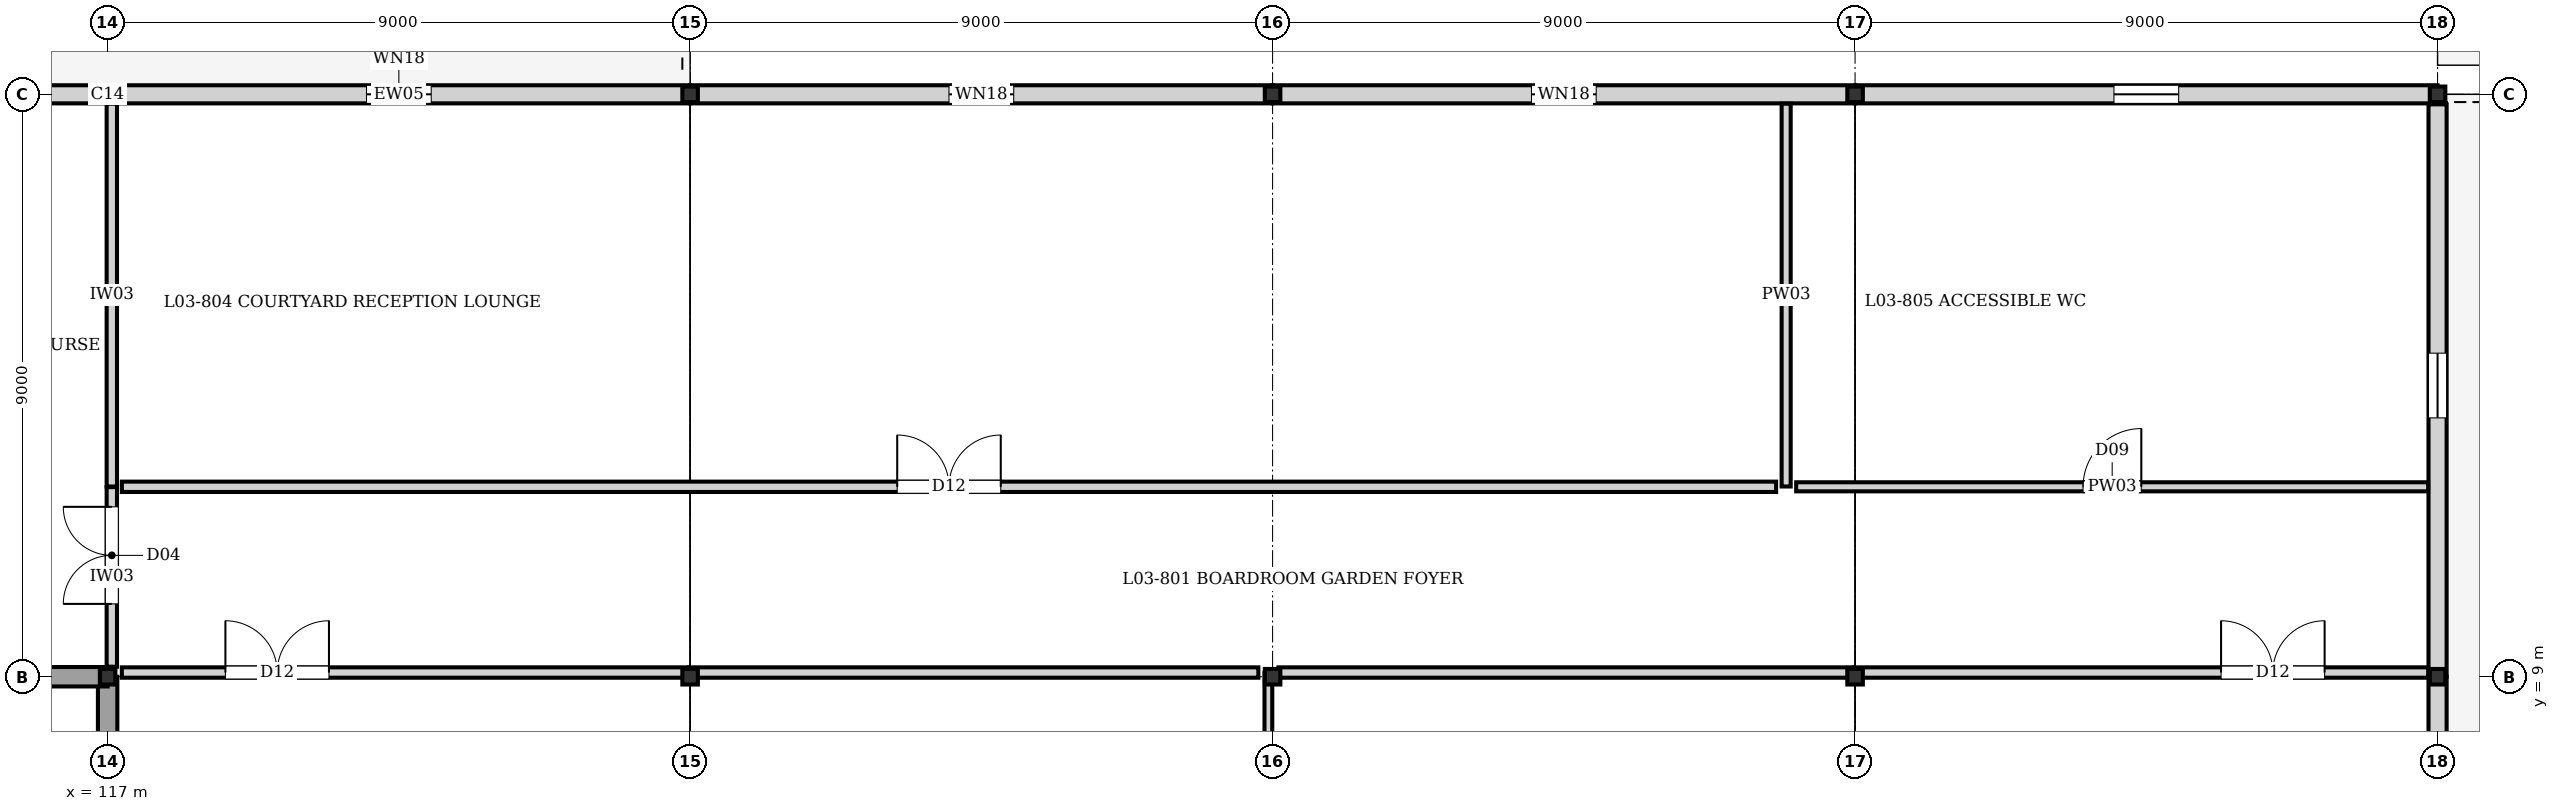
"""IFC4 building model, lengths in metres.
Left out: names, types, materials, properties, quantities, classifications, styles, units other than length and angle.
Written with IfcOpenShell. Run it as: python <this file> out.ifc"""

import sys

from ifc_helpers import new_model, si_unit, direction, frame, frame_2d, origin, origin_2d, place, context, subcontext, project, spatial, rectangle, i_section, extrude, element, fill, save


model = new_model("IFC4")
c1 = context("Model", 3, precision=1e-05, world=origin(), true_north=direction((0.0, 1.0)))
c2 = subcontext(c1, "Body", "Model", "MODEL_VIEW")
j1 = project(units=[si_unit("LENGTHUNIT", "METRE"), si_unit("PLANEANGLEUNIT", "RADIAN")], contexts=[c1])
p1 = place(None, origin())
s1 = spatial("IfcSite", under=j1, at=p1, CompositionType="ELEMENT")
p2 = place(p1, origin())
s2 = spatial("IfcBuilding", under=s1, at=p2, CompositionType="ELEMENT")
p3 = place(p2, frame((0.0, 0.0, 11.52)))
s3 = spatial("IfcBuildingStorey", under=s2, at=p3, CompositionType="ELEMENT", Elevation=11.52)
for number, where, z_axis, x_axis in (
    (1, (117.0, 9.0, 0.0), (0.0, 0.0, 1.0), (1.0, 0.0, 0.0)),
    (2, (117.0, 18.0, 0.0), (0.0, 0.0, 1.0), (1.0, 0.0, 0.0)),
    (3, (126.0, 9.0, 0.0), (0.0, 0.0, 1.0), (1.0, 0.0, 0.0)),
    (4, (126.0, 18.0, 0.0), (0.0, 0.0, 1.0), (1.0, 0.0, 0.0)),
    (5, (135.0, 9.0, 0.0), (0.0, 0.0, 1.0), (1.0, 0.0, 0.0)),
    (6, (135.0, 18.0, 0.0), (0.0, 0.0, 1.0), (1.0, 0.0, 0.0)),
    (7, (144.0, 9.0, 0.0), (0.0, 0.0, 1.0), (1.0, 0.0, 0.0)),
    (8, (144.0, 18.0, 0.0), (0.0, 0.0, 1.0), (1.0, 0.0, 0.0)),
    (9, (153.0, 9.0, 0.0), (0.0, 0.0, 1.0), (1.0, 0.0, 0.0)),
    (10, (153.0, 18.0, 0.0), (0.0, 0.0, 1.0), (1.0, 0.0, 0.0)),
):
    element("IfcColumn", number, at=place(p3, frame(where, z_axis=z_axis, x_axis=x_axis)), inside=s3, PredefinedType="COLUMN", context=c2, shape_type="SweptSolid", body=[
        extrude(i_section(OverallWidth=0.24, OverallDepth=0.24, WebThickness=0.01, FlangeThickness=0.017, at=origin_2d()), origin(), (0.0, 0.0, 1.0), 3.04),
    ])
p4 = place(p3, frame((108.0, 18.0, 0.0), z_axis=(0.0, 0.0, 1.0), x_axis=(1.0, 0.0, 0.0)))
e11 = element("IfcWall", 11, at=p4, inside=s3, PredefinedType="SOLIDWALL", context=c2, shape_type="SweptSolid", body=[
    extrude(rectangle(XDim=9.0, YDim=0.28, at=frame_2d((4.5, 0.0))), origin(), (0.0, 0.0, 1.0), 2.48),
])
p5 = place(p4, frame((3.7, 0.0, 0.0)))
e12 = element("IfcOpeningElement", 12, at=p5, cuts=e11, PredefinedType="OPENING", context=c2, shape_type="SweptSolid", body=[
    extrude(rectangle(XDim=1.6, YDim=2.25, at=frame_2d((0.8, 1.125))), frame((0.0, 0.15, 0.0), z_axis=(0.0, -1.0, 0.0), x_axis=(1.0, 0.0, 0.0)), (0.0, 0.0, 1.0), 0.3),
])
p6 = place(p3, frame((117.0, 18.0, 0.0), z_axis=(0.0, 0.0, 1.0), x_axis=(1.0, 0.0, 0.0)))
e13 = element("IfcWall", 13, at=p6, inside=s3, PredefinedType="SOLIDWALL", context=c2, shape_type="SweptSolid", body=[
    extrude(rectangle(XDim=9.0, YDim=0.28, at=frame_2d((4.5, 0.0))), origin(), (0.0, 0.0, 1.0), 2.42),
])
p7 = place(p6, frame((4.0, 0.0, 0.4)))
e14 = element("IfcOpeningElement", 14, at=p7, cuts=e13, PredefinedType="OPENING", context=c2, shape_type="SweptSolid", body=[
    extrude(rectangle(XDim=1.0, YDim=1.6, at=frame_2d((0.5, 0.8))), frame((0.0, 0.15, 0.0), z_axis=(0.0, -1.0, 0.0), x_axis=(1.0, 0.0, 0.0)), (0.0, 0.0, 1.0), 0.3),
])
p8 = place(p3, frame((126.0, 18.0, 0.0), z_axis=(0.0, 0.0, 1.0), x_axis=(1.0, 0.0, 0.0)))
e15 = element("IfcWall", 15, at=p8, inside=s3, PredefinedType="SOLIDWALL", context=c2, shape_type="SweptSolid", body=[
    extrude(rectangle(XDim=9.0, YDim=0.28, at=frame_2d((4.5, 0.0))), origin(), (0.0, 0.0, 1.0), 2.38),
])
p9 = place(p8, frame((4.0, 0.0, 0.4)))
e16 = element("IfcOpeningElement", 16, at=p9, cuts=e15, PredefinedType="OPENING", context=c2, shape_type="SweptSolid", body=[
    extrude(rectangle(XDim=1.0, YDim=1.6, at=frame_2d((0.5, 0.8))), frame((0.0, 0.15, 0.0), z_axis=(0.0, -1.0, 0.0), x_axis=(1.0, 0.0, 0.0)), (0.0, 0.0, 1.0), 0.3),
])
p10 = place(p3, frame((135.0, 18.0, 0.0), z_axis=(0.0, 0.0, 1.0), x_axis=(1.0, 0.0, 0.0)))
e17 = element("IfcWall", 17, at=p10, inside=s3, PredefinedType="SOLIDWALL", context=c2, shape_type="SweptSolid", body=[
    extrude(rectangle(XDim=9.0, YDim=0.28, at=frame_2d((4.5, 0.0))), origin(), (0.0, 0.0, 1.0), 2.55),
])
p11 = place(p10, frame((4.0, 0.0, 0.4)))
e18 = element("IfcOpeningElement", 18, at=p11, cuts=e17, PredefinedType="OPENING", context=c2, shape_type="SweptSolid", body=[
    extrude(rectangle(XDim=1.0, YDim=1.6, at=frame_2d((0.5, 0.8))), frame((0.0, 0.15, 0.0), z_axis=(0.0, -1.0, 0.0), x_axis=(1.0, 0.0, 0.0)), (0.0, 0.0, 1.0), 0.3),
])
p12 = place(p3, frame((144.0, 18.0, 0.0), z_axis=(0.0, 0.0, 1.0), x_axis=(1.0, 0.0, 0.0)))
e19 = element("IfcWall", 19, at=p12, inside=s3, PredefinedType="SOLIDWALL", context=c2, shape_type="SweptSolid", body=[
    extrude(rectangle(XDim=9.0, YDim=0.28, at=frame_2d((4.5, 0.0))), origin(), (0.0, 0.0, 1.0), 2.48),
])
p13 = place(p12, frame((4.0, 0.0, 0.4)))
e20 = element("IfcOpeningElement", 20, at=p13, cuts=e19, PredefinedType="OPENING", context=c2, shape_type="SweptSolid", body=[
    extrude(rectangle(XDim=1.0, YDim=1.6, at=frame_2d((0.5, 0.8))), frame((0.0, 0.15, 0.0), z_axis=(0.0, -1.0, 0.0), x_axis=(1.0, 0.0, 0.0)), (0.0, 0.0, 1.0), 0.3),
])
p14 = place(p3, frame((153.0, 17.845, 0.0), z_axis=(0.0, 0.0, 1.0), x_axis=(0.0, -1.0, 0.0)))
e21 = element("IfcWall", 21, at=p14, inside=s3, PredefinedType="SOLIDWALL", context=c2, shape_type="SweptSolid", body=[
    extrude(rectangle(XDim=8.845, YDim=0.28, at=frame_2d((4.422, 0.0))), origin(), (0.0, 0.0, 1.0), 2.39),
])
p15 = place(p14, frame((3.845, 0.0, 0.4)))
e22 = element("IfcOpeningElement", 22, at=p15, cuts=e21, PredefinedType="OPENING", context=c2, shape_type="SweptSolid", body=[
    extrude(rectangle(XDim=1.0, YDim=1.6, at=frame_2d((0.5, 0.8))), frame((0.0, 0.15, 0.0), z_axis=(0.0, -1.0, 0.0), x_axis=(1.0, 0.0, 0.0)), (0.0, 0.0, 1.0), 0.3),
])
p16 = place(p3, frame((153.0, 9.0, 0.0), z_axis=(0.0, 0.0, 1.0), x_axis=(0.0, -1.0, 0.0)))
e23 = element("IfcWall", 23, at=p16, inside=s3, PredefinedType="SOLIDWALL", context=c2, shape_type="SweptSolid", body=[
    extrude(rectangle(XDim=8.845, YDim=0.28, at=frame_2d((4.422, 0.0))), origin(), (0.0, 0.0, 1.0), 2.45),
])
p17 = place(p16, frame((3.7, 0.0, 0.0)))
e24 = element("IfcOpeningElement", 24, at=p17, cuts=e23, PredefinedType="OPENING", context=c2, shape_type="SweptSolid", body=[
    extrude(rectangle(XDim=1.6, YDim=2.25, at=frame_2d((0.8, 1.125))), frame((0.0, 0.15, 0.0), z_axis=(0.0, -1.0, 0.0), x_axis=(1.0, 0.0, 0.0)), (0.0, 0.0, 1.0), 0.3),
])
p18 = place(p3, frame((117.0, 0.0, 0.0), z_axis=(0.0, 0.0, 1.0), x_axis=(0.0, 1.0, 0.0)))
e25 = element("IfcWall", 25, at=p18, inside=s3, PredefinedType="SHEAR", context=c2, shape_type="SweptSolid", body=[
    extrude(rectangle(XDim=9.0, YDim=0.3, at=frame_2d((4.5, 0.0))), origin(), (0.0, 0.0, 1.0), 2.79),
])
p19 = place(p3, frame((108.0, 9.0, 0.0), z_axis=(0.0, 0.0, 1.0), x_axis=(1.0, 0.0, 0.0)))
e26 = element("IfcWall", 26, at=p19, inside=s3, PredefinedType="SHEAR", context=c2, shape_type="SweptSolid", body=[
    extrude(rectangle(XDim=9.0, YDim=0.3, at=frame_2d((4.5, 0.0))), origin(), (0.0, 0.0, 1.0), 2.79),
])
p20 = place(p19, frame((6.05, 0.0, 0.0)))
e27 = element("IfcOpeningElement", 27, at=p20, cuts=e26, PredefinedType="OPENING", context=c2, shape_type="SweptSolid", body=[
    extrude(rectangle(XDim=1.4, YDim=2.02, at=frame_2d((0.7, 1.01))), frame((0.0, 0.16, 0.0), z_axis=(0.0, -1.0, 0.0), x_axis=(1.0, 0.0, 0.0)), (0.0, 0.0, 1.0), 0.32),
])
p21 = place(p3, frame((117.065, 11.94, 0.0), z_axis=(0.0, 0.0, 1.0), x_axis=(0.0, 1.0, 0.0)))
e28 = element("IfcWall", 28, at=p21, inside=s3, PredefinedType="PARTITIONING", context=c2, shape_type="SweptSolid", body=[
    extrude(rectangle(XDim=5.915, YDim=0.16, at=frame_2d((2.958, 0.0))), origin(), (0.0, 0.0, 1.0), 2.19),
])
p22 = place(p3, frame((134.935, 0.145, 0.0), z_axis=(0.0, 0.0, 1.0), x_axis=(0.0, 1.0, 0.0)))
e29 = element("IfcWall", 29, at=p22, inside=s3, PredefinedType="PARTITIONING", context=c2, shape_type="SweptSolid", body=[
    extrude(rectangle(XDim=8.915, YDim=0.12, at=frame_2d((4.458, 0.0))), origin(), (0.0, 0.0, 1.0), 2.09),
])
p23 = place(p3, frame((142.935, 11.94, 0.0), z_axis=(0.0, 0.0, 1.0), x_axis=(0.0, 1.0, 0.0)))
e30 = element("IfcWall", 30, at=p23, inside=s3, PredefinedType="PLUMBINGWALL", context=c2, shape_type="SweptSolid", body=[
    extrude(rectangle(XDim=5.915, YDim=0.14, at=frame_2d((2.958, 0.0))), origin(), (0.0, 0.0, 1.0), 2.79),
])
p24 = place(p3, frame((117.065, 9.155, 0.0), z_axis=(0.0, 0.0, 1.0), x_axis=(0.0, 1.0, 0.0)))
e31 = element("IfcWall", 31, at=p24, inside=s3, PredefinedType="PARTITIONING", context=c2, shape_type="SweptSolid", body=[
    extrude(rectangle(XDim=2.775, YDim=0.16, at=frame_2d((1.387, 0.0))), origin(), (0.0, 0.0, 1.0), 2.19),
])
p25 = place(p24, frame((0.97, 0.0, 0.0)))
e32 = element("IfcOpeningElement", 32, at=p25, cuts=e31, PredefinedType="OPENING", context=c2, shape_type="SweptSolid", body=[
    extrude(rectangle(XDim=1.5, YDim=2.1, at=frame_2d((0.75, 1.05))), frame((0.0, 0.09, 0.0), z_axis=(0.0, -1.0, 0.0), x_axis=(1.0, 0.0, 0.0)), (0.0, 0.0, 1.0), 0.18),
])
p26 = place(p3, frame((117.22, 9.065, 0.0), z_axis=(0.0, 0.0, 1.0), x_axis=(1.0, 0.0, 0.0)))
e33 = element("IfcWall", 33, at=p26, inside=s3, PredefinedType="PARTITIONING", context=c2, shape_type="SweptSolid", body=[
    extrude(rectangle(XDim=8.76, YDim=0.16, at=frame_2d((4.38, 0.0))), origin(), (0.0, 0.0, 1.0), 2.49),
])
p27 = place(p26, frame((1.6, 0.0, 0.0)))
e34 = element("IfcOpeningElement", 34, at=p27, cuts=e33, PredefinedType="OPENING", context=c2, shape_type="SweptSolid", body=[
    extrude(rectangle(XDim=1.6, YDim=2.3, at=frame_2d((0.8, 1.15))), frame((0.0, 0.09, 0.0), z_axis=(0.0, -1.0, 0.0), x_axis=(1.0, 0.0, 0.0)), (0.0, 0.0, 1.0), 0.18),
])
p28 = place(p3, frame((135.09, 9.065, 0.0), z_axis=(0.0, 0.0, 1.0), x_axis=(1.0, 0.0, 0.0)))
e35 = element("IfcWall", 35, at=p28, inside=s3, PredefinedType="PARTITIONING", context=c2, shape_type="SweptSolid", body=[
    extrude(rectangle(XDim=8.89, YDim=0.16, at=frame_2d((4.445, 0.0))), origin(), (0.0, 0.0, 1.0), 2.39),
])
p29 = place(p3, frame((117.22, 11.935, 0.0), z_axis=(0.0, 0.0, 1.0), x_axis=(1.0, 0.0, 0.0)))
e36 = element("IfcWall", 36, at=p29, inside=s3, PredefinedType="PARTITIONING", context=c2, shape_type="SweptSolid", body=[
    extrude(rectangle(XDim=25.56, YDim=0.16, at=frame_2d((12.78, 0.0))), origin(), (0.0, 0.0, 1.0), 2.79),
])
p30 = place(p29, frame((11.98, 0.0, 0.0)))
e37 = element("IfcOpeningElement", 37, at=p30, cuts=e36, PredefinedType="OPENING", context=c2, shape_type="SweptSolid", body=[
    extrude(rectangle(XDim=1.6, YDim=2.3, at=frame_2d((0.8, 1.15))), frame((0.0, 0.09, 0.0), z_axis=(0.0, -1.0, 0.0), x_axis=(1.0, 0.0, 0.0)), (0.0, 0.0, 1.0), 0.18),
])
p31 = place(p3, frame((143.09, 11.935, 0.0), z_axis=(0.0, 0.0, 1.0), x_axis=(1.0, 0.0, 0.0)))
e38 = element("IfcWall", 38, at=p31, inside=s3, PredefinedType="PLUMBINGWALL", context=c2, shape_type="SweptSolid", body=[
    extrude(rectangle(XDim=9.765, YDim=0.14, at=frame_2d((4.882, 0.0))), origin(), (0.0, 0.0, 1.0), 2.79),
])
p32 = place(p31, frame((4.433, 0.0, 0.0)))
e39 = element("IfcOpeningElement", 39, at=p32, cuts=e38, PredefinedType="OPENING", context=c2, shape_type="SweptSolid", body=[
    extrude(rectangle(XDim=0.9, YDim=2.1, at=frame_2d((0.45, 1.05))), frame((0.0, 0.08, 0.0), z_axis=(0.0, -1.0, 0.0), x_axis=(1.0, 0.0, 0.0)), (0.0, 0.0, 1.0), 0.16),
])
p33 = place(p3, frame((125.98, 9.065, 0.0), z_axis=(0.0, 0.0, 1.0), x_axis=(1.0, 0.0, 0.0)))
e40 = element("IfcWall", 40, at=p33, inside=s3, PredefinedType="PARTITIONING", context=c2, shape_type="SweptSolid", body=[
    extrude(rectangle(XDim=8.8, YDim=0.16, at=frame_2d((4.4, 0.0))), origin(), (0.0, 0.0, 1.0), 2.45),
])
p34 = place(p3, frame((143.98, 9.065, 0.0), z_axis=(0.0, 0.0, 1.0), x_axis=(1.0, 0.0, 0.0)))
e41 = element("IfcWall", 41, at=p34, inside=s3, PredefinedType="PARTITIONING", context=c2, shape_type="SweptSolid", body=[
    extrude(rectangle(XDim=8.875, YDim=0.16, at=frame_2d((4.438, 0.0))), origin(), (0.0, 0.0, 1.0), 2.34),
])
p35 = place(p34, frame((5.675, 0.0, 0.0)))
e42 = element("IfcOpeningElement", 42, at=p35, cuts=e41, PredefinedType="OPENING", context=c2, shape_type="SweptSolid", body=[
    extrude(rectangle(XDim=1.6, YDim=2.3, at=frame_2d((0.8, 1.15))), frame((0.0, 0.09, 0.0), z_axis=(0.0, -1.0, 0.0), x_axis=(1.0, 0.0, 0.0)), (0.0, 0.0, 1.0), 0.18),
])
p36 = place(p7, origin())
e43 = element("IfcWindow", 43, at=p36, inside=s3, PartitioningType="SINGLE_PANEL", PredefinedType="WINDOW", context=c2, shape_type="SweptSolid", body=[
    extrude(rectangle(XDim=1.0, YDim=1.6, at=frame_2d((0.5, 0.8))), frame((0.0, 0.03, 0.0), z_axis=(0.0, -1.0, 0.0), x_axis=(1.0, 0.0, 0.0)), (0.0, 0.0, 1.0), 0.06),
])
fill(e14, e43)
p37 = place(p9, origin())
e44 = element("IfcWindow", 44, at=p37, inside=s3, PartitioningType="SINGLE_PANEL", PredefinedType="WINDOW", context=c2, shape_type="SweptSolid", body=[
    extrude(rectangle(XDim=1.0, YDim=1.6, at=frame_2d((0.5, 0.8))), frame((0.0, 0.03, 0.0), z_axis=(0.0, -1.0, 0.0), x_axis=(1.0, 0.0, 0.0)), (0.0, 0.0, 1.0), 0.06),
])
fill(e16, e44)
p38 = place(p11, origin())
e45 = element("IfcWindow", 45, at=p38, inside=s3, PartitioningType="SINGLE_PANEL", PredefinedType="WINDOW", context=c2, shape_type="SweptSolid", body=[
    extrude(rectangle(XDim=1.0, YDim=1.6, at=frame_2d((0.5, 0.8))), frame((0.0, 0.03, 0.0), z_axis=(0.0, -1.0, 0.0), x_axis=(1.0, 0.0, 0.0)), (0.0, 0.0, 1.0), 0.06),
])
fill(e18, e45)
p39 = place(p13, origin())
e46 = element("IfcWindow", 46, at=p39, inside=s3, PartitioningType="SINGLE_PANEL", PredefinedType="WINDOW", context=c2, shape_type="SweptSolid", body=[
    extrude(rectangle(XDim=1.0, YDim=1.6, at=frame_2d((0.5, 0.8))), frame((0.0, 0.03, 0.0), z_axis=(0.0, -1.0, 0.0), x_axis=(1.0, 0.0, 0.0)), (0.0, 0.0, 1.0), 0.06),
])
fill(e20, e46)
p40 = place(p15, origin())
e47 = element("IfcWindow", 47, at=p40, inside=s3, PartitioningType="SINGLE_PANEL", PredefinedType="WINDOW", context=c2, shape_type="SweptSolid", body=[
    extrude(rectangle(XDim=1.0, YDim=1.6, at=frame_2d((0.5, 0.8))), frame((0.0, 0.03, 0.0), z_axis=(0.0, -1.0, 0.0), x_axis=(1.0, 0.0, 0.0)), (0.0, 0.0, 1.0), 0.06),
])
fill(e22, e47)
p41 = place(p25, origin())
e48 = element("IfcDoor", 48, at=p41, inside=s3, OperationType="DOUBLE_DOOR_SINGLE_SWING", PredefinedType="DOOR", context=c2, shape_type="SweptSolid", body=[
    extrude(rectangle(XDim=1.5, YDim=2.1, at=frame_2d((0.75, 1.05))), frame((0.0, 0.025, 0.0), z_axis=(0.0, -1.0, 0.0), x_axis=(1.0, 0.0, 0.0)), (0.0, 0.0, 1.0), 0.05),
])
fill(e32, e48)
p42 = place(p27, origin())
e49 = element("IfcDoor", 49, at=p42, inside=s3, OperationType="DOUBLE_DOOR_SINGLE_SWING", PredefinedType="DOOR", context=c2, shape_type="SweptSolid", body=[
    extrude(rectangle(XDim=1.6, YDim=2.3, at=frame_2d((0.8, 1.15))), frame((0.0, 0.025, 0.0), z_axis=(0.0, -1.0, 0.0), x_axis=(1.0, 0.0, 0.0)), (0.0, 0.0, 1.0), 0.05),
])
fill(e34, e49)
p43 = place(p35, origin())
e50 = element("IfcDoor", 50, at=p43, inside=s3, OperationType="DOUBLE_DOOR_SINGLE_SWING", PredefinedType="DOOR", context=c2, shape_type="SweptSolid", body=[
    extrude(rectangle(XDim=1.6, YDim=2.3, at=frame_2d((0.8, 1.15))), frame((0.0, 0.025, 0.0), z_axis=(0.0, -1.0, 0.0), x_axis=(1.0, 0.0, 0.0)), (0.0, 0.0, 1.0), 0.05),
])
fill(e42, e50)
p44 = place(p30, origin())
e51 = element("IfcDoor", 51, at=p44, inside=s3, OperationType="DOUBLE_DOOR_SINGLE_SWING", PredefinedType="DOOR", context=c2, shape_type="SweptSolid", body=[
    extrude(rectangle(XDim=1.6, YDim=2.3, at=frame_2d((0.8, 1.15))), frame((0.0, 0.025, 0.0), z_axis=(0.0, -1.0, 0.0), x_axis=(1.0, 0.0, 0.0)), (0.0, 0.0, 1.0), 0.05),
])
fill(e37, e51)
p45 = place(p32, origin())
e52 = element("IfcDoor", 52, at=p45, inside=s3, OperationType="SINGLE_SWING_RIGHT", PredefinedType="DOOR", context=c2, shape_type="SweptSolid", body=[
    extrude(rectangle(XDim=0.9, YDim=2.1, at=frame_2d((0.45, 1.05))), frame((0.0, 0.025, 0.0), z_axis=(0.0, -1.0, 0.0), x_axis=(1.0, 0.0, 0.0)), (0.0, 0.0, 1.0), 0.05),
])
fill(e39, e52)
save(model, sys.argv[1])
